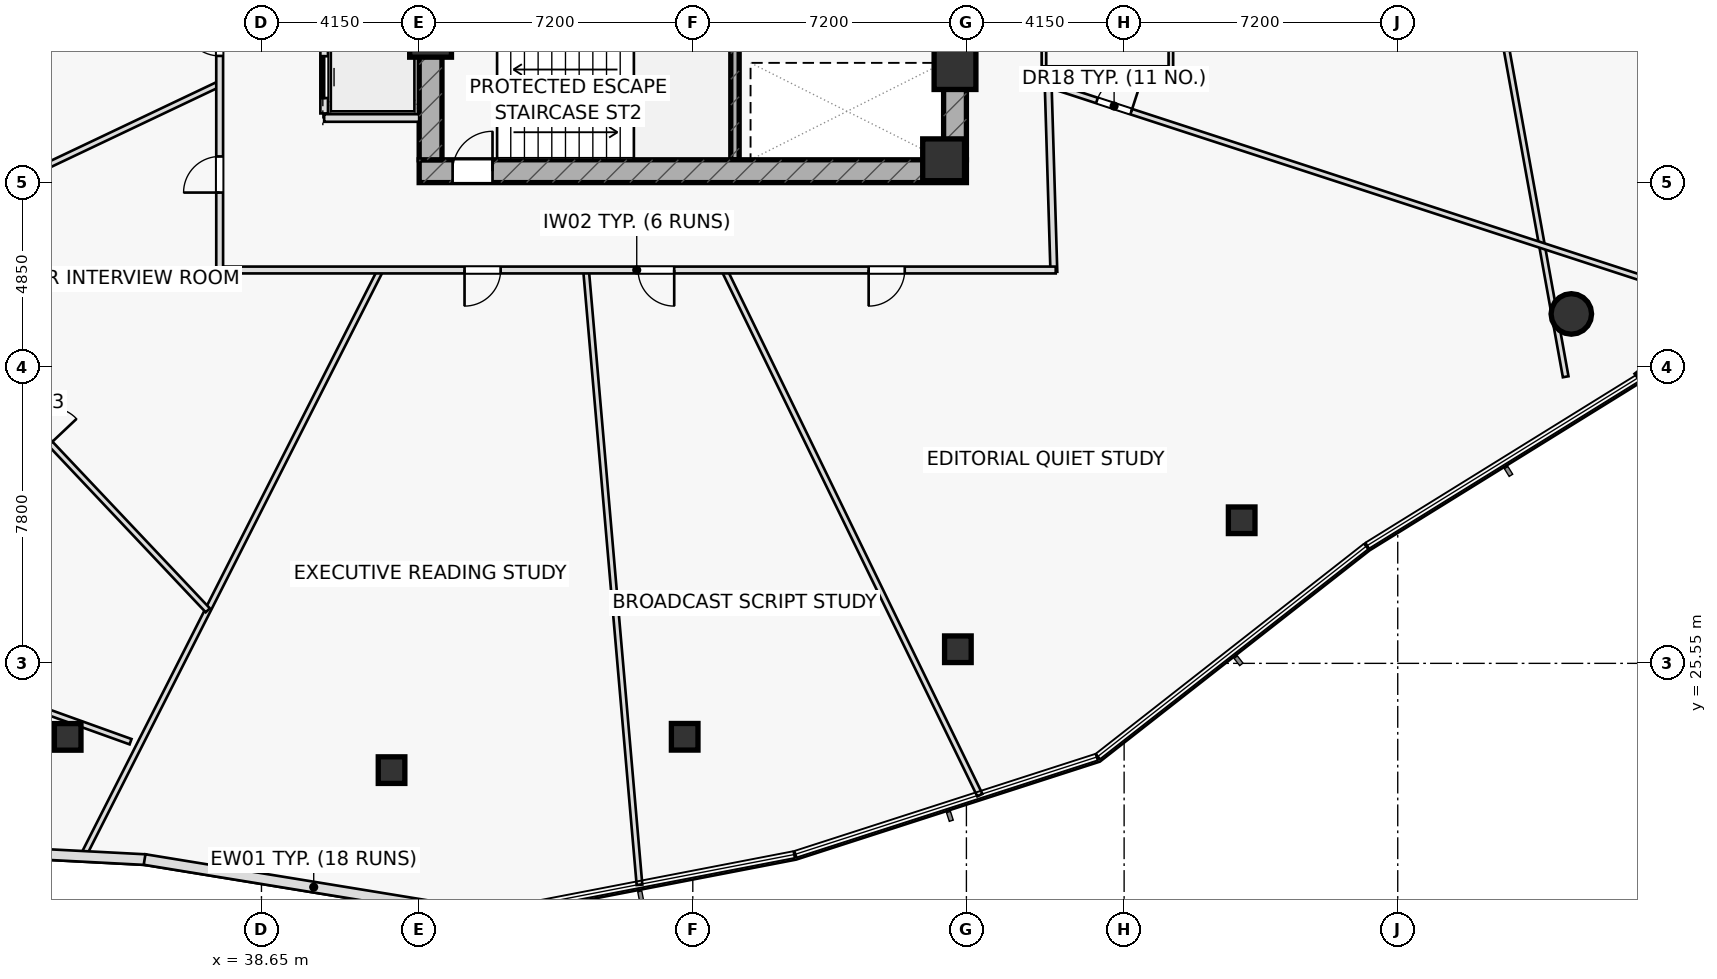
"""IFC4 building model, lengths in metres.
Left out: names, types, materials, properties, quantities, classifications, styles, units other than length and angle.
Written with IfcOpenShell. Run it as: python <this file> out.ifc"""

import sys

from ifc_helpers import new_model, si_unit, direction, frame, frame_2d, origin, origin_2d, place, context, subcontext, project, spatial, rectangle, hollow_rectangle, hollow_circle, extrude, element, fill, save


model = new_model("IFC4")
c1 = context("Model", 3, precision=1e-05, world=origin(), true_north=direction((0.0, 1.0)))
c2 = subcontext(c1, "Body", "Model", "MODEL_VIEW")
j1 = project(units=[si_unit("LENGTHUNIT", "METRE"), si_unit("PLANEANGLEUNIT", "RADIAN")], contexts=[c1])
p1 = place(None, origin())
s1 = spatial("IfcSite", under=j1, at=p1, CompositionType="ELEMENT")
p2 = place(p1, origin())
s2 = spatial("IfcBuilding", under=s1, at=p2, CompositionType="ELEMENT")
p3 = place(p2, frame((0.0, 0.0, 86.1)))
s3 = spatial("IfcBuildingStorey", under=s2, at=p3, CompositionType="ELEMENT", Elevation=86.1)
p4 = place(p3, frame((51.11, 38.8, 0.0), z_axis=(0.0, 0.0, 1.0), x_axis=(0.0, 1.0, 0.0)))
e1 = element("IfcWall", 1, at=p4, inside=s3, PredefinedType="SHEAR", context=c2, shape_type="SweptSolid", body=[
    extrude(rectangle(XDim=3.1, YDim=0.22, at=frame_2d((1.55, 0.0))), origin(), (0.0, 0.0, 1.0), 3.6),
])
p5 = place(p3, frame((42.8, 38.5, 0.0), z_axis=(0.0, 0.0, 1.0), x_axis=(1.0, 0.0, 0.0)))
e2 = element("IfcWall", 2, at=p5, inside=s3, PredefinedType="SHEAR", context=c2, shape_type="SweptSolid", body=[
    extrude(rectangle(XDim=14.4, YDim=0.6, at=frame_2d((7.2, 0.0))), origin(), (0.0, 0.0, 1.0), 3.6),
])
p6 = place(p5, frame((0.88, 0.0, 0.0)))
e3 = element("IfcOpeningElement", 3, at=p6, cuts=e2, PredefinedType="OPENING", context=c2, shape_type="SweptSolid", body=[
    extrude(rectangle(XDim=1.05, YDim=2.2, at=frame_2d((0.525, 1.1))), frame((0.0, 0.31, 0.0), z_axis=(0.0, -1.0, 0.0), x_axis=(1.0, 0.0, 0.0)), (0.0, 0.0, 1.0), 0.62),
])
p7 = place(p3, frame((43.1, 38.8, 0.0), z_axis=(0.0, 0.0, 1.0), x_axis=(0.0, 1.0, 0.0)))
e4 = element("IfcWall", 4, at=p7, inside=s3, PredefinedType="SHEAR", context=c2, shape_type="SweptSolid", body=[
    extrude(rectangle(XDim=12.4, YDim=0.6, at=frame_2d((6.2, 0.0))), origin(), (0.0, 0.0, 1.0), 3.6),
])
p8 = place(p3, frame((56.9, 38.8, 0.0), z_axis=(0.0, 0.0, 1.0), x_axis=(0.0, 1.0, 0.0)))
e5 = element("IfcWall", 5, at=p8, inside=s3, PredefinedType="SHEAR", context=c2, shape_type="SweptSolid", body=[
    extrude(rectangle(XDim=12.4, YDim=0.6, at=frame_2d((6.2, 0.0))), origin(), (0.0, 0.0, 1.0), 3.6),
])
p9 = place(p8, frame((3.85, 0.0, 0.0)))
e6 = element("IfcOpeningElement", 6, at=p9, cuts=e5, PredefinedType="OPENING", context=c2, shape_type="SweptSolid", body=[
    extrude(rectangle(XDim=1.5, YDim=2.2, at=frame_2d((0.75, 1.1))), frame((0.0, 0.31, 0.0), z_axis=(0.0, -1.0, 0.0), x_axis=(1.0, 0.0, 0.0)), (0.0, 0.0, 1.0), 0.62),
])
for number, where, z_axis, x_axis in (
    (7, (43.1, 42.05, 0.0), (0.0, 0.0, 1.0), (1.0, 0.0, 0.0)),
    (8, (56.9, 41.2, 0.0), (0.0, 0.0, 1.0), (1.0, 0.0, 0.0)),
    (9, (56.6, 38.8, 0.0), (0.0, 0.0, 1.0), (1.0, 0.0, 0.0)),
):
    element("IfcColumn", number, at=place(p3, frame(where, z_axis=z_axis, x_axis=x_axis)), inside=s3, PredefinedType="COLUMN", context=c2, shape_type="SweptSolid", body=[
        extrude(rectangle(XDim=1.1, YDim=1.1, at=origin_2d()), origin(), (0.0, 0.0, 1.0), 3.6),
    ])
for number, where, z_axis, x_axis in (
    (10, (33.551, 23.615, 0.0), (0.0, 0.0, 1.0), (1.0, 0.0, 0.0)),
    (11, (42.073, 22.74, 0.0), (0.0, 0.0, 1.0), (1.0, 0.0, 0.0)),
    (12, (49.787, 23.618, 0.0), (0.0, 0.0, 1.0), (1.0, 0.0, 0.0)),
    (13, (56.975, 25.921, 0.0), (0.0, 0.0, 1.0), (1.0, 0.0, 0.0)),
    (14, (64.444, 29.315, 0.0), (0.0, 0.0, 1.0), (1.0, 0.0, 0.0)),
):
    element("IfcColumn", number, at=place(p3, frame(where, z_axis=z_axis, x_axis=x_axis)), inside=s3, PredefinedType="COLUMN", context=c2, shape_type="SweptSolid", body=[
        extrude(hollow_rectangle(XDim=0.7, YDim=0.7, WallThickness=0.04, at=origin_2d()), origin(), (0.0, 0.0, 1.0), 3.6),
    ])
p10 = place(p3, frame((73.118, 34.744, 0.0), z_axis=(0.0, 0.0, 1.0), x_axis=(1.0, 0.0, 0.0)))
e15 = element("IfcColumn", 15, at=p10, inside=s3, PredefinedType="COLUMN", context=c2, shape_type="SweptSolid", body=[
    extrude(hollow_circle(Radius=0.533, WallThickness=0.045, at=origin_2d()), origin(), (0.0, 0.0, 1.0), 3.6),
])
p11 = place(p3, frame((40.3, 39.9, 0.0), z_axis=(0.0, 0.0, 1.0), x_axis=(1.0, 0.0, 0.0)))
e16 = element("IfcWall", 16, at=p11, inside=s3, PredefinedType="PARTITIONING", context=c2, shape_type="SweptSolid", body=[
    extrude(rectangle(XDim=2.5, YDim=0.2, at=frame_2d((1.25, 0.0))), origin(), (0.0, 0.0, 1.0), 3.6),
])
p12 = place(p3, frame((22.802, 27.945, 0.0), z_axis=(0.0, 0.0, 1.0), x_axis=(0.941102349209, -0.338121824662, 0.0)))
e17 = element("IfcWall", 17, at=p12, inside=s3, PredefinedType="PARTITIONING", context=c2, shape_type="SweptSolid", body=[
    extrude(rectangle(XDim=13.18, YDim=0.15, at=frame_2d((6.59, 0.0))), origin(), (0.0, 0.0, 1.0), 2.975),
])
p13 = place(p3, frame((72.969, 33.091, 0.0), z_axis=(0.0, 0.0, 1.0), x_axis=(-0.177742578179, 0.984077017261, 0.0)))
e18 = element("IfcWall", 18, at=p13, inside=s3, PredefinedType="PARTITIONING", context=c2, shape_type="SweptSolid", body=[
    extrude(rectangle(XDim=13.179, YDim=0.15, at=frame_2d((6.59, 0.0))), origin(), (0.0, 0.0, 1.0), 2.975),
])
p14 = place(p3, frame((59.24, 41.2, 0.0), z_axis=(0.0, 0.0, 1.0), x_axis=(0.0, 1.0, 0.0)))
e19 = element("IfcWall", 19, at=p14, inside=s3, PredefinedType="PARTITIONING", context=c2, shape_type="SweptSolid", body=[
    extrude(rectangle(XDim=7.0, YDim=0.12, at=frame_2d((3.5, 0.0))), origin(), (0.0, 0.0, 1.0), 3.6),
])
p15 = place(p14, frame((1.15, 0.0, 0.0)))
e20 = element("IfcOpeningElement", 20, at=p15, cuts=e19, PredefinedType="OPENING", context=c2, shape_type="SweptSolid", body=[
    extrude(rectangle(XDim=0.9, YDim=2.05, at=frame_2d((0.45, 1.025))), frame((0.0, 0.07, 0.0), z_axis=(0.0, -1.0, 0.0), x_axis=(1.0, 0.0, 0.0)), (0.0, 0.0, 1.0), 0.14),
])
p16 = place(p14, frame((4.7, 0.0, 0.0)))
e21 = element("IfcOpeningElement", 21, at=p16, cuts=e19, PredefinedType="OPENING", context=c2, shape_type="SweptSolid", body=[
    extrude(rectangle(XDim=0.9, YDim=2.05, at=frame_2d((0.45, 1.025))), frame((0.0, 0.07, 0.0), z_axis=(0.0, -1.0, 0.0), x_axis=(1.0, 0.0, 0.0)), (0.0, 0.0, 1.0), 0.14),
])
p17 = place(p3, frame((59.24, 41.2, 0.0), z_axis=(0.0, 0.0, 1.0), x_axis=(1.0, 0.0, 0.0)))
e22 = element("IfcWall", 22, at=p17, inside=s3, PredefinedType="PARTITIONING", context=c2, shape_type="SweptSolid", body=[
    extrude(rectangle(XDim=3.34, YDim=0.12, at=frame_2d((1.67, 0.0))), origin(), (0.0, 0.0, 1.0), 2.975),
])
p18 = place(p3, frame((62.58, 41.2, 0.0), z_axis=(0.0, 0.0, 1.0), x_axis=(0.0, 1.0, 0.0)))
e23 = element("IfcWall", 23, at=p18, inside=s3, PredefinedType="PARTITIONING", context=c2, shape_type="SweptSolid", body=[
    extrude(rectangle(XDim=7.0, YDim=0.12, at=frame_2d((3.5, 0.0))), origin(), (0.0, 0.0, 1.0), 3.6),
])
p19 = place(p3, frame((37.55, 43.28, 0.0), z_axis=(0.0, 0.0, 1.0), x_axis=(-0.9816263354, -0.190813358152, 0.0)))
e24 = element("IfcWall", 24, at=p19, inside=s3, PredefinedType="PARTITIONING", context=c2, shape_type="SweptSolid", body=[
    extrude(rectangle(XDim=17.062, YDim=0.15, at=frame_2d((8.531, 0.0))), origin(), (0.0, 0.0, 1.0), 3.025),
])
p20 = place(p3, frame((37.55, 40.8, 0.0), z_axis=(0.0, 0.0, 1.0), x_axis=(-0.903418546956, -0.428759756759, 0.0)))
e25 = element("IfcWall", 25, at=p20, inside=s3, PredefinedType="PARTITIONING", context=c2, shape_type="SweptSolid", body=[
    extrude(rectangle(XDim=17.654, YDim=0.15, at=frame_2d((8.827, 0.0))), origin(), (0.0, 0.0, 1.0), 2.975),
])
p21 = place(p3, frame((41.782, 35.9, 0.0), z_axis=(0.0, 0.0, 1.0), x_axis=(-0.452547459276, -0.891740319321, 0.0)))
e26 = element("IfcWall", 26, at=p21, inside=s3, PredefinedType="PARTITIONING", context=c2, shape_type="SweptSolid", body=[
    extrude(rectangle(XDim=17.312, YDim=0.15, at=frame_2d((8.656, 0.0))), origin(), (0.0, 0.0, 1.0), 2.975),
])
p22 = place(p3, frame((47.191, 35.9, 0.0), z_axis=(0.0, 0.0, 1.0), x_axis=(0.086603664122, -0.996242844572, 0.0)))
e27 = element("IfcWall", 27, at=p22, inside=s3, PredefinedType="PARTITIONING", context=c2, shape_type="SweptSolid", body=[
    extrude(rectangle(XDim=16.238, YDim=0.15, at=frame_2d((8.119, 0.0))), origin(), (0.0, 0.0, 1.0), 2.975),
])
p23 = place(p3, frame((50.829, 35.9, 0.0), z_axis=(0.0, 0.0, 1.0), x_axis=(0.437604942245, -0.899167345116, 0.0)))
e28 = element("IfcWall", 28, at=p23, inside=s3, PredefinedType="PARTITIONING", context=c2, shape_type="SweptSolid", body=[
    extrude(rectangle(XDim=15.367, YDim=0.15, at=frame_2d((7.684, 0.0))), origin(), (0.0, 0.0, 1.0), 3.025),
])
p24 = place(p3, frame((59.351, 40.779, 0.0), z_axis=(0.0, 0.0, 1.0), x_axis=(0.950783281681, -0.309856662468, 0.0)))
e29 = element("IfcWall", 29, at=p24, inside=s3, PredefinedType="PARTITIONING", context=c2, shape_type="SweptSolid", body=[
    extrude(rectangle(XDim=18.495, YDim=0.15, at=frame_2d((9.247, 0.0))), origin(), (0.0, 0.0, 1.0), 2.975),
])
p25 = place(p24, frame((1.35, 0.0, 0.0)))
e30 = element("IfcOpeningElement", 30, at=p25, cuts=e29, PredefinedType="OPENING", context=c2, shape_type="SweptSolid", body=[
    extrude(rectangle(XDim=0.95, YDim=2.05, at=frame_2d((0.475, 1.025))), frame((0.0, 0.085, 0.0), z_axis=(0.0, -1.0, 0.0), x_axis=(1.0, 0.0, 0.0)), (0.0, 0.0, 1.0), 0.17),
])
p26 = place(p3, frame((28.3, 36.409, 0.0), z_axis=(0.0, 0.0, 1.0), x_axis=(0.686638402181, -0.726999109113, 0.0)))
e31 = element("IfcWall", 31, at=p26, inside=s3, PredefinedType="PARTITIONING", context=c2, shape_type="SweptSolid", body=[
    extrude(rectangle(XDim=13.017, YDim=0.15, at=frame_2d((6.509, 0.0))), origin(), (0.0, 0.0, 1.0), 2.975),
])
p27 = place(p26, frame((6.034, 0.0, 0.0)))
e32 = element("IfcOpeningElement", 32, at=p27, cuts=e31, PredefinedType="OPENING", context=c2, shape_type="SweptSolid", body=[
    extrude(rectangle(XDim=0.95, YDim=2.05, at=frame_2d((0.475, 1.025))), frame((0.0, 0.085, 0.0), z_axis=(0.0, -1.0, 0.0), x_axis=(1.0, 0.0, 0.0)), (0.0, 0.0, 1.0), 0.17),
])
p28 = place(p3, frame((59.342, 41.1, 0.0), z_axis=(0.0, 0.0, 1.0), x_axis=(0.030445329425, -0.999536433511, 0.0)))
e33 = element("IfcWall", 33, at=p28, inside=s3, PredefinedType="PARTITIONING", context=c2, shape_type="SweptSolid", body=[
    extrude(rectangle(XDim=5.252, YDim=0.18, at=frame_2d((2.626, 0.0))), origin(), (0.0, 0.0, 1.0), 2.975),
])
p29 = place(p3, frame((59.55, 35.9, 0.0), z_axis=(0.0, 0.0, 1.0), x_axis=(-1.0, 0.0, 0.0)))
e34 = element("IfcWall", 34, at=p29, inside=s3, PredefinedType="PARTITIONING", context=c2, shape_type="SweptSolid", body=[
    extrude(rectangle(XDim=22.05, YDim=0.18, at=frame_2d((11.025, 0.0))), origin(), (0.0, 0.0, 1.0), 2.975),
])
p30 = place(p29, frame((3.972, 0.0, 0.0)))
e35 = element("IfcOpeningElement", 35, at=p30, cuts=e34, PredefinedType="OPENING", context=c2, shape_type="SweptSolid", body=[
    extrude(rectangle(XDim=0.95, YDim=2.05, at=frame_2d((0.475, 1.025))), frame((0.0, 0.1, 0.0), z_axis=(0.0, -1.0, 0.0), x_axis=(1.0, 0.0, 0.0)), (0.0, 0.0, 1.0), 0.2),
])
p31 = place(p29, frame((10.039, 0.0, 0.0)))
e36 = element("IfcOpeningElement", 36, at=p31, cuts=e34, PredefinedType="OPENING", context=c2, shape_type="SweptSolid", body=[
    extrude(rectangle(XDim=0.95, YDim=2.05, at=frame_2d((0.475, 1.025))), frame((0.0, 0.1, 0.0), z_axis=(0.0, -1.0, 0.0), x_axis=(1.0, 0.0, 0.0)), (0.0, 0.0, 1.0), 0.2),
])
p32 = place(p29, frame((14.606, 0.0, 0.0)))
e37 = element("IfcOpeningElement", 37, at=p32, cuts=e34, PredefinedType="OPENING", context=c2, shape_type="SweptSolid", body=[
    extrude(rectangle(XDim=0.95, YDim=2.05, at=frame_2d((0.475, 1.025))), frame((0.0, 0.1, 0.0), z_axis=(0.0, -1.0, 0.0), x_axis=(1.0, 0.0, 0.0)), (0.0, 0.0, 1.0), 0.2),
])
p33 = place(p3, frame((37.55, 35.85, 0.0), z_axis=(0.0, 0.0, 1.0), x_axis=(0.0, 1.0, 0.0)))
e38 = element("IfcWall", 38, at=p33, inside=s3, PredefinedType="PARTITIONING", context=c2, shape_type="SweptSolid", body=[
    extrude(rectangle(XDim=12.65, YDim=0.18, at=frame_2d((6.325, 0.0))), origin(), (0.0, 0.0, 1.0), 2.975),
])
p34 = place(p33, frame((2.088, 0.0, 0.0)))
e39 = element("IfcOpeningElement", 39, at=p34, cuts=e38, PredefinedType="OPENING", context=c2, shape_type="SweptSolid", body=[
    extrude(rectangle(XDim=0.95, YDim=2.05, at=frame_2d((0.475, 1.025))), frame((0.0, 0.1, 0.0), z_axis=(0.0, -1.0, 0.0), x_axis=(1.0, 0.0, 0.0)), (0.0, 0.0, 1.0), 0.2),
])
p35 = place(p33, frame((5.683, 0.0, 0.0)))
e40 = element("IfcOpeningElement", 40, at=p35, cuts=e38, PredefinedType="OPENING", context=c2, shape_type="SweptSolid", body=[
    extrude(rectangle(XDim=0.95, YDim=2.05, at=frame_2d((0.475, 1.025))), frame((0.0, 0.1, 0.0), z_axis=(0.0, -1.0, 0.0), x_axis=(1.0, 0.0, 0.0)), (0.0, 0.0, 1.0), 0.2),
])
p36 = place(p33, frame((8.173, 0.0, 0.0)))
e41 = element("IfcOpeningElement", 41, at=p36, cuts=e38, PredefinedType="OPENING", context=c2, shape_type="SweptSolid", body=[
    extrude(rectangle(XDim=0.95, YDim=2.05, at=frame_2d((0.475, 1.025))), frame((0.0, 0.1, 0.0), z_axis=(0.0, -1.0, 0.0), x_axis=(1.0, 0.0, 0.0)), (0.0, 0.0, 1.0), 0.2),
])
p37 = place(p33, frame((10.675, 0.0, 0.0)))
e42 = element("IfcOpeningElement", 42, at=p37, cuts=e38, PredefinedType="OPENING", context=c2, shape_type="SweptSolid", body=[
    extrude(rectangle(XDim=0.95, YDim=2.05, at=frame_2d((0.475, 1.025))), frame((0.0, 0.1, 0.0), z_axis=(0.0, -1.0, 0.0), x_axis=(1.0, 0.0, 0.0)), (0.0, 0.0, 1.0), 0.2),
])
p38 = place(p3, frame((27.187, 20.823, 0.0), z_axis=(0.0, 0.0, 1.0), x_axis=(0.998650284982, -0.051938505032, 0.0)))
e43 = element("IfcWall", 43, at=p38, inside=s3, PredefinedType="STANDARD", context=c2, shape_type="SweptSolid", body=[
    extrude(rectangle(XDim=8.428, YDim=0.28, at=frame_2d((4.214, 0.0))), origin(), (0.0, 0.0, 1.0), 3.6),
])
p39 = place(p3, frame((35.574, 20.389, 0.0), z_axis=(0.0, 0.0, 1.0), x_axis=(0.986949303504, -0.161031277435, 0.0)))
e44 = element("IfcWall", 44, at=p39, inside=s3, PredefinedType="STANDARD", context=c2, shape_type="SweptSolid", body=[
    extrude(rectangle(XDim=9.019, YDim=0.28, at=frame_2d((4.51, 0.0))), origin(), (0.0, 0.0, 1.0), 3.6),
])
p40 = place(p3, frame((74.868, 33.059, 0.0), z_axis=(0.0, 0.0, 1.0), x_axis=(0.788540193269, 0.61498322221, 0.0)))
e45 = element("IfcWall", 45, at=p40, inside=s3, PredefinedType="STANDARD", context=c2, shape_type="SweptSolid", body=[
    extrude(rectangle(XDim=2.188, YDim=0.28, at=frame_2d((1.094, 0.0))), origin(), (0.0, 0.0, 1.0), 3.6),
])
p41 = place(p3, frame((76.944, 40.45, 0.0), z_axis=(0.0, 0.0, 1.0), x_axis=(-0.454362243703, 0.890817013476, 0.0)))
e46 = element("IfcWall", 46, at=p41, inside=s3, PredefinedType="STANDARD", context=c2, shape_type="SweptSolid", body=[
    extrude(rectangle(XDim=8.412, YDim=0.28, at=frame_2d((4.206, 0.0))), origin(), (0.0, 0.0, 1.0), 3.6),
])
p42 = place(p3, frame((40.3, 40.02, 0.0), z_axis=(0.0, 0.0, 1.0), x_axis=(0.0, 1.0, 0.0)))
e47 = element("IfcWall", 47, at=p42, inside=s3, PredefinedType="PARTITIONING", context=c2, shape_type="SweptSolid", body=[
    extrude(rectangle(XDim=8.21, YDim=0.2, at=frame_2d((4.105, 0.0))), origin(), (0.0, 0.0, 1.0), 3.6),
])
p43 = place(p42, frame((0.405, 0.0, 0.0)))
e48 = element("IfcOpeningElement", 48, at=p43, cuts=e47, PredefinedType="OPENING", context=c2, shape_type="SweptSolid", body=[
    extrude(rectangle(XDim=1.1, YDim=2.15, at=frame_2d((0.55, 1.075))), frame((0.0, 0.11, 0.0), z_axis=(0.0, -1.0, 0.0), x_axis=(1.0, 0.0, 0.0)), (0.0, 0.0, 1.0), 0.22),
])
p44 = place(p42, frame((2.505, 0.0, 0.0)))
e49 = element("IfcOpeningElement", 49, at=p44, cuts=e47, PredefinedType="OPENING", context=c2, shape_type="SweptSolid", body=[
    extrude(rectangle(XDim=1.1, YDim=2.15, at=frame_2d((0.55, 1.075))), frame((0.0, 0.11, 0.0), z_axis=(0.0, -1.0, 0.0), x_axis=(1.0, 0.0, 0.0)), (0.0, 0.0, 1.0), 0.22),
])
p45 = place(p42, frame((4.605, 0.0, 0.0)))
e50 = element("IfcOpeningElement", 50, at=p45, cuts=e47, PredefinedType="OPENING", context=c2, shape_type="SweptSolid", body=[
    extrude(rectangle(XDim=1.1, YDim=2.15, at=frame_2d((0.55, 1.075))), frame((0.0, 0.11, 0.0), z_axis=(0.0, -1.0, 0.0), x_axis=(1.0, 0.0, 0.0)), (0.0, 0.0, 1.0), 0.22),
])
p46 = place(p42, frame((6.705, 0.0, 0.0)))
e51 = element("IfcOpeningElement", 51, at=p46, cuts=e47, PredefinedType="OPENING", context=c2, shape_type="SweptSolid", body=[
    extrude(rectangle(XDim=1.1, YDim=2.15, at=frame_2d((0.55, 1.075))), frame((0.0, 0.11, 0.0), z_axis=(0.0, -1.0, 0.0), x_axis=(1.0, 0.0, 0.0)), (0.0, 0.0, 1.0), 0.22),
])
p47 = place(p6, origin())
e52 = element("IfcDoor", 52, at=p47, inside=s3, OperationType="SINGLE_SWING_RIGHT", PredefinedType="DOOR", context=c2, shape_type="SweptSolid", body=[
    extrude(rectangle(XDim=1.05, YDim=2.2, at=frame_2d((0.525, 1.1))), frame((0.0, 0.025, 0.0), z_axis=(0.0, -1.0, 0.0), x_axis=(1.0, 0.0, 0.0)), (0.0, 0.0, 1.0), 0.05),
])
fill(e3, e52)
p48 = place(p25, origin())
e53 = element("IfcDoor", 53, at=p48, inside=s3, OperationType="SINGLE_SWING_RIGHT", PredefinedType="DOOR", context=c2, shape_type="SweptSolid", body=[
    extrude(rectangle(XDim=0.95, YDim=2.05, at=frame_2d((0.475, 1.025))), frame((0.0, 0.025, 0.0), z_axis=(0.0, -1.0, 0.0), x_axis=(1.0, 0.0, 0.0)), (0.0, 0.0, 1.0), 0.05),
])
fill(e30, e53)
p49 = place(p30, origin())
e54 = element("IfcDoor", 54, at=p49, inside=s3, OperationType="SINGLE_SWING_RIGHT", PredefinedType="DOOR", context=c2, shape_type="SweptSolid", body=[
    extrude(rectangle(XDim=0.95, YDim=2.05, at=frame_2d((0.475, 1.025))), frame((0.0, 0.025, 0.0), z_axis=(0.0, -1.0, 0.0), x_axis=(1.0, 0.0, 0.0)), (0.0, 0.0, 1.0), 0.05),
])
fill(e35, e54)
p50 = place(p31, origin())
e55 = element("IfcDoor", 55, at=p50, inside=s3, OperationType="SINGLE_SWING_LEFT", PredefinedType="DOOR", context=c2, shape_type="SweptSolid", body=[
    extrude(rectangle(XDim=0.95, YDim=2.05, at=frame_2d((0.475, 1.025))), frame((0.0, 0.025, 0.0), z_axis=(0.0, -1.0, 0.0), x_axis=(1.0, 0.0, 0.0)), (0.0, 0.0, 1.0), 0.05),
])
fill(e36, e55)
p51 = place(p32, origin())
e56 = element("IfcDoor", 56, at=p51, inside=s3, OperationType="SINGLE_SWING_RIGHT", PredefinedType="DOOR", context=c2, shape_type="SweptSolid", body=[
    extrude(rectangle(XDim=0.95, YDim=2.05, at=frame_2d((0.475, 1.025))), frame((0.0, 0.025, 0.0), z_axis=(0.0, -1.0, 0.0), x_axis=(1.0, 0.0, 0.0)), (0.0, 0.0, 1.0), 0.05),
])
fill(e37, e56)
p52 = place(p34, origin())
e57 = element("IfcDoor", 57, at=p52, inside=s3, OperationType="SINGLE_SWING_LEFT", PredefinedType="DOOR", context=c2, shape_type="SweptSolid", body=[
    extrude(rectangle(XDim=0.95, YDim=2.05, at=frame_2d((0.475, 1.025))), frame((0.0, 0.025, 0.0), z_axis=(0.0, -1.0, 0.0), x_axis=(1.0, 0.0, 0.0)), (0.0, 0.0, 1.0), 0.05),
])
fill(e39, e57)
p53 = place(p35, origin())
e58 = element("IfcDoor", 58, at=p53, inside=s3, OperationType="SINGLE_SWING_RIGHT", PredefinedType="DOOR", context=c2, shape_type="SweptSolid", body=[
    extrude(rectangle(XDim=0.95, YDim=2.05, at=frame_2d((0.475, 1.025))), frame((0.0, 0.025, 0.0), z_axis=(0.0, -1.0, 0.0), x_axis=(1.0, 0.0, 0.0)), (0.0, 0.0, 1.0), 0.05),
])
fill(e40, e58)
p54 = place(p43, origin())
e59 = element("IfcDoor", 59, at=p54, inside=s3, OperationType="SLIDING_TO_LEFT", PredefinedType="DOOR", context=c2, shape_type="SweptSolid", body=[
    extrude(rectangle(XDim=1.1, YDim=2.15, at=frame_2d((0.55, 1.075))), frame((0.0, 0.025, 0.0), z_axis=(0.0, -1.0, 0.0), x_axis=(1.0, 0.0, 0.0)), (0.0, 0.0, 1.0), 0.05),
])
fill(e48, e59)
save(model, sys.argv[1])
